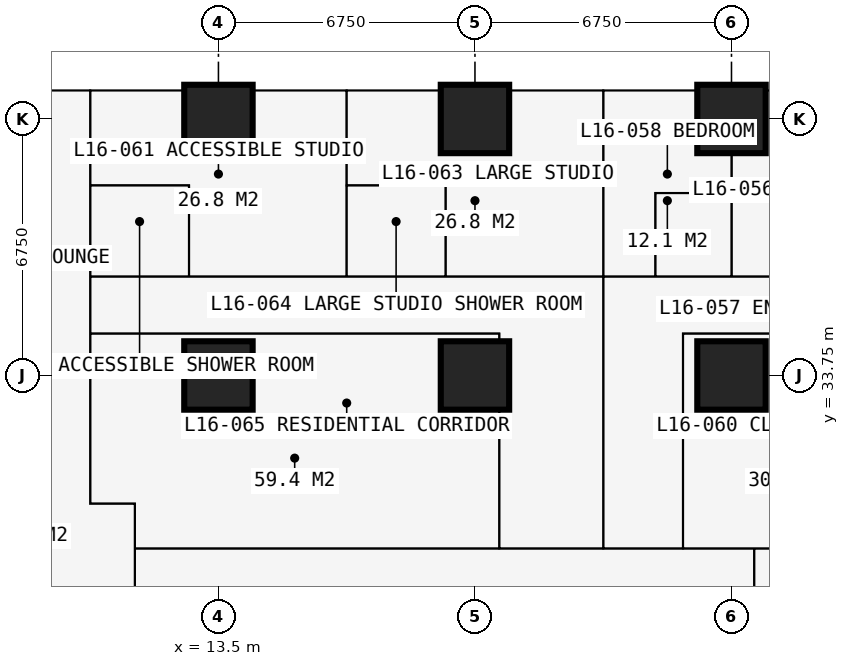
"""IFC4 building model, lengths in metres.
Left out: names, types, materials, properties, quantities, classifications, styles, units other than length and angle.
Written with IfcOpenShell. Run it as: python <this file> out.ifc"""

import sys

from ifc_helpers import new_model, si_unit, direction, frame, frame_2d, origin, origin_2d, place, context, subcontext, project, spatial, rectangle, extrude, element, fill, save


model = new_model("IFC4")
c1 = context("Model", 3, precision=1e-05, world=origin(), true_north=direction((0.0, 1.0)))
c2 = subcontext(c1, "Body", "Model", "MODEL_VIEW")
j1 = project(units=[si_unit("LENGTHUNIT", "METRE"), si_unit("PLANEANGLEUNIT", "RADIAN")], contexts=[c1])
p1 = place(None, origin())
s1 = spatial("IfcSite", under=j1, at=p1, CompositionType="ELEMENT")
p2 = place(p1, origin())
s2 = spatial("IfcBuilding", under=s1, at=p2, CompositionType="ELEMENT")
p3 = place(p2, frame((0.0, 0.0, 61.2)))
s3 = spatial("IfcBuildingStorey", under=s2, at=p3, CompositionType="ELEMENT", Elevation=61.2)
for number, where, z_axis, x_axis in (
    (1, (13.5, 33.75, 0.0), (0.0, 0.0, 1.0), (1.0, 0.0, 0.0)),
    (2, (13.5, 40.5, 0.0), (0.0, 0.0, 1.0), (1.0, 0.0, 0.0)),
    (3, (20.25, 33.75, 0.0), (0.0, 0.0, 1.0), (1.0, 0.0, 0.0)),
    (4, (20.25, 40.5, 0.0), (0.0, 0.0, 1.0), (1.0, 0.0, 0.0)),
    (5, (27.0, 33.75, 0.0), (0.0, 0.0, 1.0), (1.0, 0.0, 0.0)),
    (6, (27.0, 40.5, 0.0), (0.0, 0.0, 1.0), (1.0, 0.0, 0.0)),
):
    element("IfcColumn", number, at=place(p3, frame(where, z_axis=z_axis, x_axis=x_axis)), inside=s3, PredefinedType="COLUMN", context=c2, shape_type="SweptSolid", body=[
        extrude(rectangle(XDim=1.8, YDim=1.8, at=origin_2d()), origin(), (0.0, 0.0, 1.0), 3.6),
    ])
p4 = place(p3, frame((13.5, 41.25, 0.0), z_axis=(0.0, 0.0, 1.0), x_axis=(1.0, 0.0, 0.0)))
e7 = element("IfcWall", 7, at=p4, inside=s3, PredefinedType="SOLIDWALL", context=c2, shape_type="SweptSolid", body=[
    extrude(rectangle(XDim=6.75, YDim=0.15, at=frame_2d((3.375, 0.0))), origin(), (0.0, 0.0, 1.0), 3.375),
])
p5 = place(p4, frame((0.962, 0.0, 0.0)))
e8 = element("IfcOpeningElement", 8, at=p5, cuts=e7, PredefinedType="OPENING", context=c2, shape_type="SweptSolid", body=[
    extrude(rectangle(XDim=1.0, YDim=2.2, at=frame_2d((0.5, 1.1))), frame((0.0, 0.085, 0.0), z_axis=(0.0, -1.0, 0.0), x_axis=(1.0, 0.0, 0.0)), (0.0, 0.0, 1.0), 0.17),
])
p6 = place(p4, frame((2.025, 0.0, 0.9)))
e9 = element("IfcOpeningElement", 9, at=p6, cuts=e7, PredefinedType="OPENING", context=c2, shape_type="SweptSolid", body=[
    extrude(rectangle(XDim=1.2, YDim=1.8, at=frame_2d((0.6, 0.9))), frame((0.0, 0.085, 0.0), z_axis=(0.0, -1.0, 0.0), x_axis=(1.0, 0.0, 0.0)), (0.0, 0.0, 1.0), 0.17),
])
p7 = place(p4, frame((4.788, 0.0, 0.0)))
e10 = element("IfcOpeningElement", 10, at=p7, cuts=e7, PredefinedType="OPENING", context=c2, shape_type="SweptSolid", body=[
    extrude(rectangle(XDim=1.0, YDim=2.2, at=frame_2d((0.5, 1.1))), frame((0.0, 0.085, 0.0), z_axis=(0.0, -1.0, 0.0), x_axis=(1.0, 0.0, 0.0)), (0.0, 0.0, 1.0), 0.17),
])
p8 = place(p4, frame((3.525, 0.0, 0.9)))
e11 = element("IfcOpeningElement", 11, at=p8, cuts=e7, PredefinedType="OPENING", context=c2, shape_type="SweptSolid", body=[
    extrude(rectangle(XDim=1.2, YDim=1.8, at=frame_2d((0.6, 0.9))), frame((0.0, 0.085, 0.0), z_axis=(0.0, -1.0, 0.0), x_axis=(1.0, 0.0, 0.0)), (0.0, 0.0, 1.0), 0.17),
])
p9 = place(p3, frame((16.875, 41.35, 0.0), z_axis=(0.0, 0.0, 1.0), x_axis=(0.0, 1.0, 0.0)))
e12 = element("IfcWall", 12, at=p9, inside=s3, PredefinedType="USERDEFINED", context=c2, shape_type="SweptSolid", body=[
    extrude(rectangle(XDim=2.2, YDim=1.0, at=frame_2d((1.1, 0.0))), origin(), (0.0, 0.0, 1.0), 0.9),
])
p10 = place(p3, frame((4.15, 33.75, 0.0), z_axis=(0.0, 0.0, 1.0), x_axis=(1.0, 0.0, 0.0)))
e13 = element("IfcWall", 13, at=p10, inside=s3, PredefinedType="PARTITIONING", context=c2, shape_type="SweptSolid", body=[
    extrude(rectangle(XDim=5.975, YDim=0.15, at=frame_2d((2.988, 0.0))), origin(), (0.0, 0.0, 1.0), 2.877),
])
p11 = place(p3, frame((10.125, 30.375, 0.0), z_axis=(0.0, 0.0, 1.0), x_axis=(0.0, 1.0, 0.0)))
e14 = element("IfcWall", 14, at=p11, inside=s3, PredefinedType="PARTITIONING", context=c2, shape_type="SweptSolid", body=[
    extrude(rectangle(XDim=10.859, YDim=0.15, at=frame_2d((5.429, 0.0))), origin(), (0.0, 0.0, 1.0), 3.375),
])
p12 = place(p11, frame((4.725, 0.0, 0.0)))
e15 = element("IfcOpeningElement", 15, at=p12, cuts=e14, PredefinedType="OPENING", context=c2, shape_type="SweptSolid", body=[
    extrude(rectangle(XDim=1.0, YDim=2.2, at=frame_2d((0.5, 1.1))), frame((0.0, 0.085, 0.0), z_axis=(0.0, -1.0, 0.0), x_axis=(1.0, 0.0, 0.0)), (0.0, 0.0, 1.0), 0.17),
])
p13 = place(p3, frame((10.125, 30.375, 0.0), z_axis=(0.0, 0.0, 1.0), x_axis=(1.0, 0.0, 0.0)))
e16 = element("IfcWall", 16, at=p13, inside=s3, PredefinedType="PARTITIONING", context=c2, shape_type="SweptSolid", body=[
    extrude(rectangle(XDim=1.175, YDim=0.15, at=frame_2d((0.587, 0.0))), origin(), (0.0, 0.0, 1.0), 3.375),
])
p14 = place(p3, frame((10.125, 34.85, 0.0), z_axis=(0.0, 0.0, 1.0), x_axis=(1.0, 0.0, 0.0)))
e17 = element("IfcWall", 17, at=p14, inside=s3, PredefinedType="PARTITIONING", context=c2, shape_type="SweptSolid", body=[
    extrude(rectangle(XDim=10.762, YDim=0.15, at=frame_2d((5.381, 0.0))), origin(), (0.0, 0.0, 1.0), 3.375),
])
p15 = place(p14, frame((4.9, 0.0, 0.0)))
e18 = element("IfcOpeningElement", 18, at=p15, cuts=e17, PredefinedType="OPENING", context=c2, shape_type="SweptSolid", body=[
    extrude(rectangle(XDim=0.95, YDim=2.2, at=frame_2d((0.475, 1.1))), frame((0.0, 0.085, 0.0), z_axis=(0.0, -1.0, 0.0), x_axis=(1.0, 0.0, 0.0)), (0.0, 0.0, 1.0), 0.17),
])
p16 = place(p3, frame((10.125, 36.35, 0.0), z_axis=(0.0, 0.0, 1.0), x_axis=(1.0, 0.0, 0.0)))
e19 = element("IfcWall", 19, at=p16, inside=s3, PredefinedType="PARTITIONING", context=c2, shape_type="SweptSolid", body=[
    extrude(rectangle(XDim=23.625, YDim=0.15, at=frame_2d((11.812, 0.0))), origin(), (0.0, 0.0, 1.0), 3.375),
])
p17 = place(p16, frame((20.5, 0.0, 0.0)))
e20 = element("IfcOpeningElement", 20, at=p17, cuts=e19, PredefinedType="OPENING", context=c2, shape_type="SweptSolid", body=[
    extrude(rectangle(XDim=0.95, YDim=2.2, at=frame_2d((0.475, 1.1))), frame((0.0, 0.085, 0.0), z_axis=(0.0, -1.0, 0.0), x_axis=(1.0, 0.0, 0.0)), (0.0, 0.0, 1.0), 0.17),
])
p18 = place(p16, frame((17.125, 0.0, 0.0)))
e21 = element("IfcOpeningElement", 21, at=p18, cuts=e19, PredefinedType="OPENING", context=c2, shape_type="SweptSolid", body=[
    extrude(rectangle(XDim=0.95, YDim=2.2, at=frame_2d((0.475, 1.1))), frame((0.0, 0.085, 0.0), z_axis=(0.0, -1.0, 0.0), x_axis=(1.0, 0.0, 0.0)), (0.0, 0.0, 1.0), 0.17),
])
p19 = place(p16, frame((13.7, 0.0, 0.0)))
e22 = element("IfcOpeningElement", 22, at=p19, cuts=e19, PredefinedType="OPENING", context=c2, shape_type="SweptSolid", body=[
    extrude(rectangle(XDim=0.95, YDim=2.2, at=frame_2d((0.475, 1.1))), frame((0.0, 0.085, 0.0), z_axis=(0.0, -1.0, 0.0), x_axis=(1.0, 0.0, 0.0)), (0.0, 0.0, 1.0), 0.17),
])
p20 = place(p16, frame((4.2, 0.0, 0.0)))
e23 = element("IfcOpeningElement", 23, at=p20, cuts=e19, PredefinedType="OPENING", context=c2, shape_type="SweptSolid", body=[
    extrude(rectangle(XDim=0.95, YDim=2.2, at=frame_2d((0.475, 1.1))), frame((0.0, 0.085, 0.0), z_axis=(0.0, -1.0, 0.0), x_axis=(1.0, 0.0, 0.0)), (0.0, 0.0, 1.0), 0.17),
])
p21 = place(p16, frame((10.95, 0.0, 0.0)))
e24 = element("IfcOpeningElement", 24, at=p21, cuts=e19, PredefinedType="OPENING", context=c2, shape_type="SweptSolid", body=[
    extrude(rectangle(XDim=0.95, YDim=2.2, at=frame_2d((0.475, 1.1))), frame((0.0, 0.085, 0.0), z_axis=(0.0, -1.0, 0.0), x_axis=(1.0, 0.0, 0.0)), (0.0, 0.0, 1.0), 0.17),
])
p22 = place(p3, frame((10.125, 38.75, 0.0), z_axis=(0.0, 0.0, 1.0), x_axis=(1.0, 0.0, 0.0)))
e25 = element("IfcWall", 25, at=p22, inside=s3, PredefinedType="PARTITIONING", context=c2, shape_type="SweptSolid", body=[
    extrude(rectangle(XDim=2.6, YDim=0.1, at=frame_2d((1.3, 0.0))), origin(), (0.0, 0.0, 1.0), 3.375),
])
p23 = place(p22, frame((0.85, 0.0, 0.0)))
e26 = element("IfcOpeningElement", 26, at=p23, cuts=e25, PredefinedType="OPENING", context=c2, shape_type="SweptSolid", body=[
    extrude(rectangle(XDim=0.9, YDim=2.2, at=frame_2d((0.45, 1.1))), frame((0.0, 0.06, 0.0), z_axis=(0.0, -1.0, 0.0), x_axis=(1.0, 0.0, 0.0)), (0.0, 0.0, 1.0), 0.12),
])
p24 = place(p3, frame((11.3, 11.3, 0.0), z_axis=(0.0, 0.0, 1.0), x_axis=(0.0, 1.0, 0.0)))
e27 = element("IfcWall", 27, at=p24, inside=s3, PredefinedType="PARTITIONING", context=c2, shape_type="SweptSolid", body=[
    extrude(rectangle(XDim=19.075, YDim=0.15, at=frame_2d((9.538, 0.0))), origin(), (0.0, 0.0, 1.0), 3.375),
])
p25 = place(p24, frame((10.137, 0.0, 0.0)))
e28 = element("IfcOpeningElement", 28, at=p25, cuts=e27, PredefinedType="OPENING", context=c2, shape_type="SweptSolid", body=[
    extrude(rectangle(XDim=1.0, YDim=2.2, at=frame_2d((0.5, 1.1))), frame((0.0, 0.085, 0.0), z_axis=(0.0, -1.0, 0.0), x_axis=(1.0, 0.0, 0.0)), (0.0, 0.0, 1.0), 0.17),
])
p26 = place(p3, frame((11.3, 29.2, 0.0), z_axis=(0.0, 0.0, 1.0), x_axis=(1.0, 0.0, 0.0)))
e29 = element("IfcWall", 29, at=p26, inside=s3, PredefinedType="PARTITIONING", context=c2, shape_type="SweptSolid", body=[
    extrude(rectangle(XDim=19.075, YDim=0.15, at=frame_2d((9.538, 0.0))), origin(), (0.0, 0.0, 1.0), 3.375),
])
p27 = place(p26, frame((12.875, 0.0, 0.0)))
e30 = element("IfcOpeningElement", 30, at=p27, cuts=e29, PredefinedType="OPENING", context=c2, shape_type="SweptSolid", body=[
    extrude(rectangle(XDim=1.0, YDim=2.2, at=frame_2d((0.5, 1.1))), frame((0.0, 0.085, 0.0), z_axis=(0.0, -1.0, 0.0), x_axis=(1.0, 0.0, 0.0)), (0.0, 0.0, 1.0), 0.17),
])
p28 = place(p26, frame((10.438, 0.0, 0.0)))
e31 = element("IfcOpeningElement", 31, at=p28, cuts=e29, PredefinedType="OPENING", context=c2, shape_type="SweptSolid", body=[
    extrude(rectangle(XDim=1.0, YDim=2.2, at=frame_2d((0.5, 1.1))), frame((0.0, 0.085, 0.0), z_axis=(0.0, -1.0, 0.0), x_axis=(1.0, 0.0, 0.0)), (0.0, 0.0, 1.0), 0.17),
])
p29 = place(p26, frame((14.875, 0.0, 0.0)))
e32 = element("IfcOpeningElement", 32, at=p29, cuts=e29, PredefinedType="OPENING", context=c2, shape_type="SweptSolid", body=[
    extrude(rectangle(XDim=0.95, YDim=2.2, at=frame_2d((0.475, 1.1))), frame((0.0, 0.085, 0.0), z_axis=(0.0, -1.0, 0.0), x_axis=(1.0, 0.0, 0.0)), (0.0, 0.0, 1.0), 0.17),
])
p30 = place(p3, frame((12.725, 36.35, 0.0), z_axis=(0.0, 0.0, 1.0), x_axis=(0.0, 1.0, 0.0)))
e33 = element("IfcWall", 33, at=p30, inside=s3, PredefinedType="PARTITIONING", context=c2, shape_type="SweptSolid", body=[
    extrude(rectangle(XDim=2.4, YDim=0.1, at=frame_2d((1.2, 0.0))), origin(), (0.0, 0.0, 1.0), 3.375),
])
p31 = place(p3, frame((16.875, 36.35, 0.0), z_axis=(0.0, 0.0, 1.0), x_axis=(0.0, 1.0, 0.0)))
e34 = element("IfcWall", 34, at=p31, inside=s3, PredefinedType="PARTITIONING", context=c2, shape_type="SweptSolid", body=[
    extrude(rectangle(XDim=4.884, YDim=0.175, at=frame_2d((2.442, 0.0))), origin(), (0.0, 0.0, 1.0), 3.375),
])
p32 = place(p31, frame((0.75, 0.0, 0.0)))
e35 = element("IfcOpeningElement", 35, at=p32, cuts=e34, PredefinedType="OPENING", context=c2, shape_type="SweptSolid", body=[
    extrude(rectangle(XDim=0.9, YDim=2.2, at=frame_2d((0.45, 1.1))), frame((0.0, 0.097, 0.0), z_axis=(0.0, -1.0, 0.0), x_axis=(1.0, 0.0, 0.0)), (0.0, 0.0, 1.0), 0.195),
])
p33 = place(p3, frame((16.875, 38.75, 0.0), z_axis=(0.0, 0.0, 1.0), x_axis=(1.0, 0.0, 0.0)))
e36 = element("IfcWall", 36, at=p33, inside=s3, PredefinedType="PARTITIONING", context=c2, shape_type="SweptSolid", body=[
    extrude(rectangle(XDim=2.6, YDim=0.1, at=frame_2d((1.3, 0.0))), origin(), (0.0, 0.0, 1.0), 3.375),
])
p34 = place(p3, frame((19.475, 36.35, 0.0), z_axis=(0.0, 0.0, 1.0), x_axis=(0.0, 1.0, 0.0)))
e37 = element("IfcWall", 37, at=p34, inside=s3, PredefinedType="PARTITIONING", context=c2, shape_type="SweptSolid", body=[
    extrude(rectangle(XDim=2.4, YDim=0.1, at=frame_2d((1.2, 0.0))), origin(), (0.0, 0.0, 1.0), 3.375),
])
p35 = place(p3, frame((20.887, 29.2, 0.0), z_axis=(0.0, 0.0, 1.0), x_axis=(0.0, 1.0, 0.0)))
e38 = element("IfcWall", 38, at=p35, inside=s3, PredefinedType="PARTITIONING", context=c2, shape_type="SweptSolid", body=[
    extrude(rectangle(XDim=5.65, YDim=0.15, at=frame_2d((2.825, 0.0))), origin(), (0.0, 0.0, 1.0), 3.375),
])
p36 = place(p3, frame((23.625, 29.2, 0.0), z_axis=(0.0, 0.0, 1.0), x_axis=(0.0, 1.0, 0.0)))
e39 = element("IfcWall", 39, at=p36, inside=s3, PredefinedType="PARTITIONING", context=c2, shape_type="SweptSolid", body=[
    extrude(rectangle(XDim=12.034, YDim=0.15, at=frame_2d((6.017, 0.0))), origin(), (0.0, 0.0, 1.0), 3.375),
])
p37 = place(p3, frame((25.0, 36.35, 0.0), z_axis=(0.0, 0.0, 1.0), x_axis=(0.0, 1.0, 0.0)))
e40 = element("IfcWall", 40, at=p37, inside=s3, PredefinedType="PARTITIONING", context=c2, shape_type="SweptSolid", body=[
    extrude(rectangle(XDim=2.2, YDim=0.1, at=frame_2d((1.1, 0.0))), origin(), (0.0, 0.0, 1.0), 3.375),
])
p38 = place(p3, frame((25.0, 38.55, 0.0), z_axis=(0.0, 0.0, 1.0), x_axis=(1.0, 0.0, 0.0)))
e41 = element("IfcWall", 41, at=p38, inside=s3, PredefinedType="PARTITIONING", context=c2, shape_type="SweptSolid", body=[
    extrude(rectangle(XDim=2.0, YDim=0.1, at=frame_2d((1.0, 0.0))), origin(), (0.0, 0.0, 1.0), 3.375),
])
p39 = place(p3, frame((25.725, 29.2, 0.0), z_axis=(0.0, 0.0, 1.0), x_axis=(0.0, 1.0, 0.0)))
e42 = element("IfcWall", 42, at=p39, inside=s3, PredefinedType="PARTITIONING", context=c2, shape_type="SweptSolid", body=[
    extrude(rectangle(XDim=5.65, YDim=0.15, at=frame_2d((2.825, 0.0))), origin(), (0.0, 0.0, 1.0), 3.375),
])
p40 = place(p3, frame((25.725, 34.85, 0.0), z_axis=(0.0, 0.0, 1.0), x_axis=(1.0, 0.0, 0.0)))
e43 = element("IfcWall", 43, at=p40, inside=s3, PredefinedType="PARTITIONING", context=c2, shape_type="SweptSolid", body=[
    extrude(rectangle(XDim=5.575, YDim=0.15, at=frame_2d((2.788, 0.0))), origin(), (0.0, 0.0, 1.0), 3.375),
])
p41 = place(p3, frame((27.0, 36.35, 0.0), z_axis=(0.0, 0.0, 1.0), x_axis=(0.0, 1.0, 0.0)))
e44 = element("IfcWall", 44, at=p41, inside=s3, PredefinedType="PARTITIONING", context=c2, shape_type="SweptSolid", body=[
    extrude(rectangle(XDim=4.884, YDim=0.175, at=frame_2d((2.442, 0.0))), origin(), (0.0, 0.0, 1.0), 2.61),
])
p42 = place(p41, frame((0.65, 0.0, 0.0)))
e45 = element("IfcOpeningElement", 45, at=p42, cuts=e44, PredefinedType="OPENING", context=c2, shape_type="SweptSolid", body=[
    extrude(rectangle(XDim=0.9, YDim=2.2, at=frame_2d((0.45, 1.1))), frame((0.0, 0.097, 0.0), z_axis=(0.0, -1.0, 0.0), x_axis=(1.0, 0.0, 0.0)), (0.0, 0.0, 1.0), 0.195),
])
p43 = place(p3, frame((27.6, 27.6, 0.0), z_axis=(0.0, 0.0, 1.0), x_axis=(0.0, 1.0, 0.0)))
e46 = element("IfcWall", 46, at=p43, inside=s3, PredefinedType="PARTITIONING", context=c2, shape_type="SweptSolid", body=[
    extrude(rectangle(XDim=1.6, YDim=0.15, at=frame_2d((0.8, 0.0))), origin(), (0.0, 0.0, 1.0), 3.375),
])
p44 = place(p43, frame((0.3, 0.0, 0.0)))
e47 = element("IfcOpeningElement", 47, at=p44, cuts=e46, PredefinedType="OPENING", context=c2, shape_type="SweptSolid", body=[
    extrude(rectangle(XDim=0.95, YDim=2.2, at=frame_2d((0.475, 1.1))), frame((0.0, 0.085, 0.0), z_axis=(0.0, -1.0, 0.0), x_axis=(1.0, 0.0, 0.0)), (0.0, 0.0, 1.0), 0.17),
])
p45 = place(p5, origin())
e48 = element("IfcDoor", 48, at=p45, inside=s3, OperationType="SINGLE_SWING_LEFT", PredefinedType="DOOR", context=c2, shape_type="SweptSolid", body=[
    extrude(rectangle(XDim=1.0, YDim=2.2, at=frame_2d((0.5, 1.1))), frame((0.0, 0.025, 0.0), z_axis=(0.0, -1.0, 0.0), x_axis=(1.0, 0.0, 0.0)), (0.0, 0.0, 1.0), 0.05),
])
fill(e8, e48)
p46 = place(p6, origin())
e49 = element("IfcWindow", 49, at=p46, inside=s3, PartitioningType="SINGLE_PANEL", PredefinedType="WINDOW", context=c2, shape_type="SweptSolid", body=[
    extrude(rectangle(XDim=1.2, YDim=1.8, at=frame_2d((0.6, 0.9))), frame((0.0, 0.03, 0.0), z_axis=(0.0, -1.0, 0.0), x_axis=(1.0, 0.0, 0.0)), (0.0, 0.0, 1.0), 0.06),
])
fill(e9, e49)
p47 = place(p7, origin())
e50 = element("IfcDoor", 50, at=p47, inside=s3, OperationType="SINGLE_SWING_RIGHT", PredefinedType="DOOR", context=c2, shape_type="SweptSolid", body=[
    extrude(rectangle(XDim=1.0, YDim=2.2, at=frame_2d((0.5, 1.1))), frame((0.0, 0.025, 0.0), z_axis=(0.0, -1.0, 0.0), x_axis=(1.0, 0.0, 0.0)), (0.0, 0.0, 1.0), 0.05),
])
fill(e10, e50)
p48 = place(p8, origin())
e51 = element("IfcWindow", 51, at=p48, inside=s3, PartitioningType="SINGLE_PANEL", PredefinedType="WINDOW", context=c2, shape_type="SweptSolid", body=[
    extrude(rectangle(XDim=1.2, YDim=1.8, at=frame_2d((0.6, 0.9))), frame((0.0, 0.03, 0.0), z_axis=(0.0, -1.0, 0.0), x_axis=(1.0, 0.0, 0.0)), (0.0, 0.0, 1.0), 0.06),
])
fill(e11, e51)
p49 = place(p44, origin())
e52 = element("IfcDoor", 52, at=p49, inside=s3, OperationType="SINGLE_SWING_LEFT", PredefinedType="DOOR", context=c2, shape_type="SweptSolid", body=[
    extrude(rectangle(XDim=0.95, YDim=2.2, at=frame_2d((0.475, 1.1))), frame((0.0, 0.025, 0.0), z_axis=(0.0, -1.0, 0.0), x_axis=(1.0, 0.0, 0.0)), (0.0, 0.0, 1.0), 0.05),
])
fill(e47, e52)
p50 = place(p18, origin())
e53 = element("IfcDoor", 53, at=p50, inside=s3, OperationType="SINGLE_SWING_LEFT", PredefinedType="DOOR", context=c2, shape_type="SweptSolid", body=[
    extrude(rectangle(XDim=0.95, YDim=2.2, at=frame_2d((0.475, 1.1))), frame((0.0, 0.025, 0.0), z_axis=(0.0, -1.0, 0.0), x_axis=(1.0, 0.0, 0.0)), (0.0, 0.0, 1.0), 0.05),
])
fill(e21, e53)
p51 = place(p19, origin())
e54 = element("IfcDoor", 54, at=p51, inside=s3, OperationType="SINGLE_SWING_LEFT", PredefinedType="DOOR", context=c2, shape_type="SweptSolid", body=[
    extrude(rectangle(XDim=0.95, YDim=2.2, at=frame_2d((0.475, 1.1))), frame((0.0, 0.025, 0.0), z_axis=(0.0, -1.0, 0.0), x_axis=(1.0, 0.0, 0.0)), (0.0, 0.0, 1.0), 0.05),
])
fill(e22, e54)
p52 = place(p42, origin())
e55 = element("IfcDoor", 55, at=p52, inside=s3, OperationType="SINGLE_SWING_RIGHT", PredefinedType="DOOR", context=c2, shape_type="SweptSolid", body=[
    extrude(rectangle(XDim=0.9, YDim=2.2, at=frame_2d((0.45, 1.1))), frame((0.0, 0.025, 0.0), z_axis=(0.0, -1.0, 0.0), x_axis=(1.0, 0.0, 0.0)), (0.0, 0.0, 1.0), 0.05),
])
fill(e45, e55)
p53 = place(p27, origin())
e56 = element("IfcDoor", 56, at=p53, inside=s3, OperationType="SINGLE_SWING_LEFT", PredefinedType="DOOR", context=c2, shape_type="SweptSolid", body=[
    extrude(rectangle(XDim=1.0, YDim=2.2, at=frame_2d((0.5, 1.1))), frame((0.0, 0.025, 0.0), z_axis=(0.0, -1.0, 0.0), x_axis=(1.0, 0.0, 0.0)), (0.0, 0.0, 1.0), 0.05),
])
fill(e30, e56)
p54 = place(p20, origin())
e57 = element("IfcDoor", 57, at=p54, inside=s3, OperationType="SINGLE_SWING_LEFT", PredefinedType="DOOR", context=c2, shape_type="SweptSolid", body=[
    extrude(rectangle(XDim=0.95, YDim=2.2, at=frame_2d((0.475, 1.1))), frame((0.0, 0.025, 0.0), z_axis=(0.0, -1.0, 0.0), x_axis=(1.0, 0.0, 0.0)), (0.0, 0.0, 1.0), 0.05),
])
fill(e23, e57)
p55 = place(p23, origin())
e58 = element("IfcDoor", 58, at=p55, inside=s3, OperationType="SINGLE_SWING_RIGHT", PredefinedType="DOOR", context=c2, shape_type="SweptSolid", body=[
    extrude(rectangle(XDim=0.9, YDim=2.2, at=frame_2d((0.45, 1.1))), frame((0.0, 0.025, 0.0), z_axis=(0.0, -1.0, 0.0), x_axis=(1.0, 0.0, 0.0)), (0.0, 0.0, 1.0), 0.05),
])
fill(e26, e58)
p56 = place(p21, origin())
e59 = element("IfcDoor", 59, at=p56, inside=s3, OperationType="SINGLE_SWING_LEFT", PredefinedType="DOOR", context=c2, shape_type="SweptSolid", body=[
    extrude(rectangle(XDim=0.95, YDim=2.2, at=frame_2d((0.475, 1.1))), frame((0.0, 0.025, 0.0), z_axis=(0.0, -1.0, 0.0), x_axis=(1.0, 0.0, 0.0)), (0.0, 0.0, 1.0), 0.05),
])
fill(e24, e59)
p57 = place(p32, origin())
e60 = element("IfcDoor", 60, at=p57, inside=s3, OperationType="SINGLE_SWING_RIGHT", PredefinedType="DOOR", context=c2, shape_type="SweptSolid", body=[
    extrude(rectangle(XDim=0.9, YDim=2.2, at=frame_2d((0.45, 1.1))), frame((0.0, 0.025, 0.0), z_axis=(0.0, -1.0, 0.0), x_axis=(1.0, 0.0, 0.0)), (0.0, 0.0, 1.0), 0.05),
])
fill(e35, e60)
p58 = place(p28, origin())
e61 = element("IfcDoor", 61, at=p58, inside=s3, OperationType="SINGLE_SWING_LEFT", PredefinedType="DOOR", context=c2, shape_type="SweptSolid", body=[
    extrude(rectangle(XDim=1.0, YDim=2.2, at=frame_2d((0.5, 1.1))), frame((0.0, 0.025, 0.0), z_axis=(0.0, -1.0, 0.0), x_axis=(1.0, 0.0, 0.0)), (0.0, 0.0, 1.0), 0.05),
])
fill(e31, e61)
p59 = place(p29, origin())
e62 = element("IfcDoor", 62, at=p59, inside=s3, OperationType="SINGLE_SWING_LEFT", PredefinedType="DOOR", context=c2, shape_type="SweptSolid", body=[
    extrude(rectangle(XDim=0.95, YDim=2.2, at=frame_2d((0.475, 1.1))), frame((0.0, 0.025, 0.0), z_axis=(0.0, -1.0, 0.0), x_axis=(1.0, 0.0, 0.0)), (0.0, 0.0, 1.0), 0.05),
])
fill(e32, e62)
p60 = place(p15, origin())
e63 = element("IfcDoor", 63, at=p60, inside=s3, OperationType="SINGLE_SWING_LEFT", PredefinedType="DOOR", context=c2, shape_type="SweptSolid", body=[
    extrude(rectangle(XDim=0.95, YDim=2.2, at=frame_2d((0.475, 1.1))), frame((0.0, 0.025, 0.0), z_axis=(0.0, -1.0, 0.0), x_axis=(1.0, 0.0, 0.0)), (0.0, 0.0, 1.0), 0.05),
])
fill(e18, e63)
p61 = place(p12, origin())
e64 = element("IfcDoor", 64, at=p61, inside=s3, OperationType="SINGLE_SWING_LEFT", PredefinedType="DOOR", context=c2, shape_type="SweptSolid", body=[
    extrude(rectangle(XDim=1.0, YDim=2.2, at=frame_2d((0.5, 1.1))), frame((0.0, 0.025, 0.0), z_axis=(0.0, -1.0, 0.0), x_axis=(1.0, 0.0, 0.0)), (0.0, 0.0, 1.0), 0.05),
])
fill(e15, e64)
save(model, sys.argv[1])
